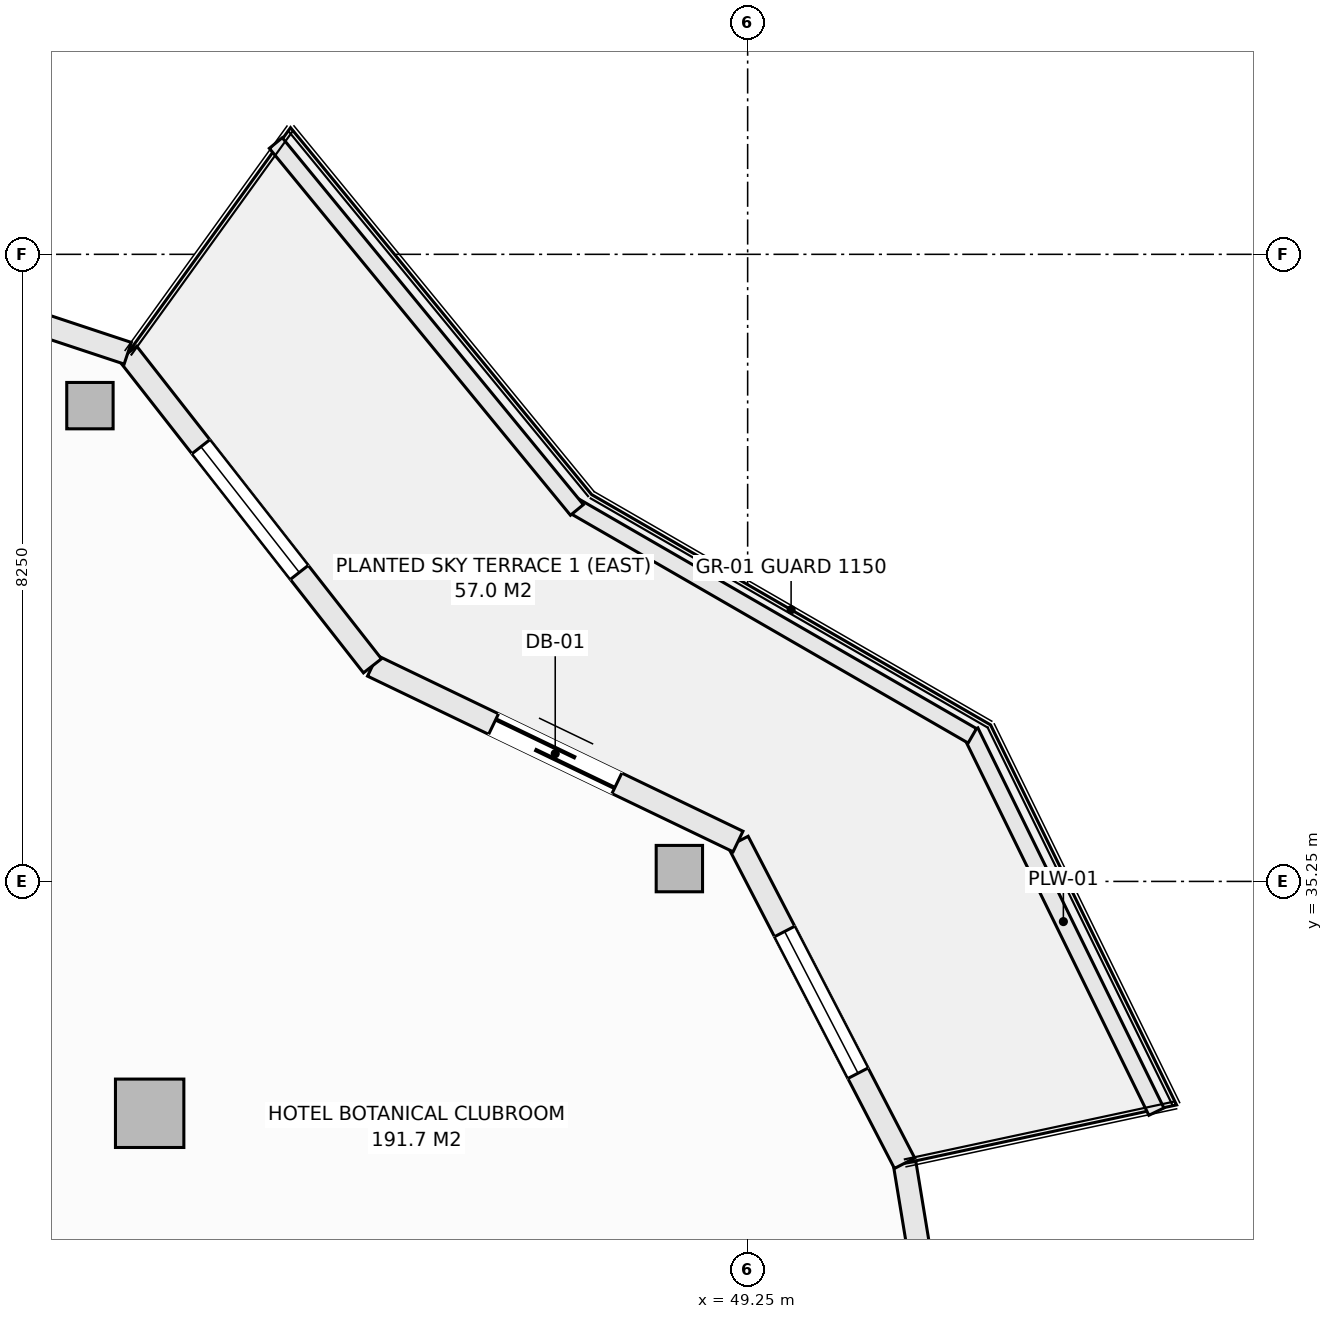
"""IFC4 building model, lengths in metres.
Left out: names, types, materials, properties, quantities, classifications, styles, units other than length and angle.
Written with IfcOpenShell. Run it as: python <this file> out.ifc"""

import sys

from ifc_helpers import new_model, si_unit, direction, frame, frame_2d, origin, origin_2d, place, context, subcontext, project, spatial, rectangle, hollow_rectangle, extrude, element, fill, save


model = new_model("IFC4")
c1 = context("Model", 3, precision=1e-05, world=origin(), true_north=direction((0.0, 1.0)))
c2 = subcontext(c1, "Body", "Model", "MODEL_VIEW")
j1 = project(units=[si_unit("LENGTHUNIT", "METRE"), si_unit("PLANEANGLEUNIT", "RADIAN")], contexts=[c1])
p1 = place(None, origin())
s1 = spatial("IfcSite", under=j1, at=p1, CompositionType="ELEMENT")
p2 = place(p1, origin())
s2 = spatial("IfcBuilding", under=s1, at=p2, CompositionType="ELEMENT")
p3 = place(p2, frame((0.0, 0.0, 156.3)))
s3 = spatial("IfcBuildingStorey", under=s2, at=p3, CompositionType="ELEMENT", Elevation=156.3)
for number, where, z_axis, x_axis in (
    (1, (48.352, 35.419, -0.27), (0.0, 0.0, 1.0), (1.0, 0.0, 0.0)),
    (2, (40.596, 41.51, -0.27), (0.0, 0.0, 1.0), (1.0, 0.0, 0.0)),
):
    element("IfcColumn", number, at=place(p3, frame(where, z_axis=z_axis, x_axis=x_axis)), inside=s3, PredefinedType="COLUMN", context=c2, shape_type="SweptSolid", body=[
        extrude(hollow_rectangle(XDim=0.61, YDim=0.61, WallThickness=0.025, at=origin_2d()), origin(), (0.0, 0.0, 1.0), 3.4),
    ])
p4 = place(p3, frame((41.382, 32.199, -0.27), z_axis=(0.0, 0.0, 1.0), x_axis=(1.0, 0.0, 0.0)))
e3 = element("IfcColumn", 3, at=p4, inside=s3, PredefinedType="COLUMN", context=c2, shape_type="SweptSolid", body=[
    extrude(rectangle(XDim=0.9, YDim=0.9, at=origin_2d()), origin(), (0.0, 0.0, 1.0), 3.4),
])
p5 = place(p3, frame((51.315, 31.542, 0.0), z_axis=(0.0, 0.0, 1.0), x_axis=(0.162394765401, -0.986725868806, 0.0)))
e4 = element("IfcWall", 4, at=p5, inside=s3, PredefinedType="SOLIDWALL", context=c2, shape_type="SweptSolid", body=[
    extrude(rectangle(XDim=4.603, YDim=0.3, at=frame_2d((2.302, 0.0))), origin(), (0.0, 0.0, 1.0), 2.653),
])
p6 = place(p5, frame((1.252, 0.0, 0.74)))
e5 = element("IfcOpeningElement", 5, at=p6, cuts=e4, PredefinedType="OPENING", context=c2, shape_type="SweptSolid", body=[
    extrude(rectangle(XDim=2.1, YDim=1.7, at=frame_2d((1.05, 0.85))), frame((0.0, 0.16, 0.0), z_axis=(0.0, -1.0, 0.0), x_axis=(1.0, 0.0, 0.0)), (0.0, 0.0, 1.0), 0.32),
])
p7 = place(p3, frame((49.123, 35.775, 0.0), z_axis=(0.0, 0.0, 1.0), x_axis=(0.459810251451, -0.888017191647, 0.0)))
e6 = element("IfcWall", 6, at=p7, inside=s3, PredefinedType="SOLIDWALL", context=c2, shape_type="SweptSolid", body=[
    extrude(rectangle(XDim=4.766, YDim=0.3, at=frame_2d((2.383, 0.0))), origin(), (0.0, 0.0, 1.0), 2.653),
])
p8 = place(p7, frame((1.333, 0.0, 0.74)))
e7 = element("IfcOpeningElement", 7, at=p8, cuts=e6, PredefinedType="OPENING", context=c2, shape_type="SweptSolid", body=[
    extrude(rectangle(XDim=2.1, YDim=1.7, at=frame_2d((1.05, 0.85))), frame((0.0, 0.16, 0.0), z_axis=(0.0, -1.0, 0.0), x_axis=(1.0, 0.0, 0.0)), (0.0, 0.0, 1.0), 0.32),
])
p9 = place(p3, frame((44.313, 38.086, 0.0), z_axis=(0.0, 0.0, 1.0), x_axis=(0.901353070301, -0.433085029363, 0.0)))
e8 = element("IfcWall", 8, at=p9, inside=s3, PredefinedType="SOLIDWALL", context=c2, shape_type="SweptSolid", body=[
    extrude(rectangle(XDim=5.336, YDim=0.3, at=frame_2d((2.668, 0.0))), origin(), (0.0, 0.0, 1.0), 2.653),
])
p10 = place(p9, frame((1.768, 0.0, 0.0)))
e9 = element("IfcOpeningElement", 9, at=p10, cuts=e8, PredefinedType="OPENING", context=c2, shape_type="SweptSolid", body=[
    extrude(rectangle(XDim=1.8, YDim=2.25, at=frame_2d((0.9, 1.125))), frame((0.0, 0.16, 0.0), z_axis=(0.0, -1.0, 0.0), x_axis=(1.0, 0.0, 0.0)), (0.0, 0.0, 1.0), 0.32),
])
p11 = place(p3, frame((41.094, 42.199, 0.0), z_axis=(0.0, 0.0, 1.0), x_axis=(0.616429245738, -0.787410302828, 0.0)))
e10 = element("IfcWall", 10, at=p11, inside=s3, PredefinedType="SOLIDWALL", context=c2, shape_type="SweptSolid", body=[
    extrude(rectangle(XDim=5.223, YDim=0.3, at=frame_2d((2.612, 0.0))), origin(), (0.0, 0.0, 1.0), 2.653),
])
p12 = place(p11, frame((1.562, 0.0, 0.74)))
e11 = element("IfcOpeningElement", 11, at=p12, cuts=e10, PredefinedType="OPENING", context=c2, shape_type="SweptSolid", body=[
    extrude(rectangle(XDim=2.1, YDim=1.7, at=frame_2d((1.05, 0.85))), frame((0.0, 0.16, 0.0), z_axis=(0.0, -1.0, 0.0), x_axis=(1.0, 0.0, 0.0)), (0.0, 0.0, 1.0), 0.32),
])
p13 = place(p3, frame((35.803, 43.952, 0.0), z_axis=(0.0, 0.0, 1.0), x_axis=(0.949246811547, -0.314532177636, 0.0)))
e12 = element("IfcWall", 12, at=p13, inside=s3, PredefinedType="SOLIDWALL", context=c2, shape_type="SweptSolid", body=[
    extrude(rectangle(XDim=5.574, YDim=0.3, at=frame_2d((2.787, 0.0))), origin(), (0.0, 0.0, 1.0), 2.653),
])
p14 = place(p13, frame((1.737, 0.0, 0.74)))
e13 = element("IfcOpeningElement", 13, at=p14, cuts=e12, PredefinedType="OPENING", context=c2, shape_type="SweptSolid", body=[
    extrude(rectangle(XDim=2.1, YDim=1.7, at=frame_2d((1.05, 0.85))), frame((0.0, 0.16, 0.0), z_axis=(0.0, -1.0, 0.0), x_axis=(1.0, 0.0, 0.0)), (0.0, 0.0, 1.0), 0.32),
])
p15 = place(p3, frame((52.18, 37.221, 0.0), z_axis=(0.0, 0.0, 1.0), x_axis=(0.439637174641, -0.898175458735, 0.0)))
e14 = element("IfcWall", 14, at=p15, inside=s3, PredefinedType="PARAPET", context=c2, shape_type="SweptSolid", body=[
    extrude(rectangle(XDim=5.567, YDim=0.22, at=frame_2d((2.784, 0.0))), origin(), (0.0, 0.0, 1.0), 0.52),
])
p16 = place(p3, frame((46.958, 40.195, 0.0), z_axis=(0.0, 0.0, 1.0), x_axis=(0.866058128659, -0.499943314571, 0.0)))
e15 = element("IfcWall", 15, at=p16, inside=s3, PredefinedType="PARAPET", context=c2, shape_type="SweptSolid", body=[
    extrude(rectangle(XDim=6.06, YDim=0.22, at=frame_2d((3.03, 0.0))), origin(), (0.0, 0.0, 1.0), 0.52),
])
p17 = place(p3, frame((43.042, 44.964, 0.0), z_axis=(0.0, 0.0, 1.0), x_axis=(0.634429234628, -0.77298094818, 0.0)))
e16 = element("IfcWall", 16, at=p17, inside=s3, PredefinedType="PARAPET", context=c2, shape_type="SweptSolid", body=[
    extrude(rectangle(XDim=6.245, YDim=0.22, at=frame_2d((3.123, 0.0))), origin(), (0.0, 0.0, 1.0), 0.52),
])
p18 = place(p8, origin())
e17 = element("IfcWindow", 17, at=p18, inside=s3, PartitioningType="SINGLE_PANEL", PredefinedType="WINDOW", context=c2, shape_type="SweptSolid", body=[
    extrude(rectangle(XDim=2.1, YDim=1.7, at=frame_2d((1.05, 0.85))), frame((0.0, 0.03, 0.0), z_axis=(0.0, -1.0, 0.0), x_axis=(1.0, 0.0, 0.0)), (0.0, 0.0, 1.0), 0.06),
])
fill(e7, e17)
p19 = place(p10, origin())
e18 = element("IfcDoor", 18, at=p19, inside=s3, OperationType="SLIDING_TO_LEFT", PredefinedType="DOOR", context=c2, shape_type="SweptSolid", body=[
    extrude(rectangle(XDim=1.8, YDim=2.25, at=frame_2d((0.9, 1.125))), frame((0.0, 0.025, 0.0), z_axis=(0.0, -1.0, 0.0), x_axis=(1.0, 0.0, 0.0)), (0.0, 0.0, 1.0), 0.05),
])
fill(e9, e18)
p20 = place(p12, origin())
e19 = element("IfcWindow", 19, at=p20, inside=s3, PartitioningType="SINGLE_PANEL", PredefinedType="WINDOW", context=c2, shape_type="SweptSolid", body=[
    extrude(rectangle(XDim=2.1, YDim=1.7, at=frame_2d((1.05, 0.85))), frame((0.0, 0.03, 0.0), z_axis=(0.0, -1.0, 0.0), x_axis=(1.0, 0.0, 0.0)), (0.0, 0.0, 1.0), 0.06),
])
fill(e11, e19)
save(model, sys.argv[1])
